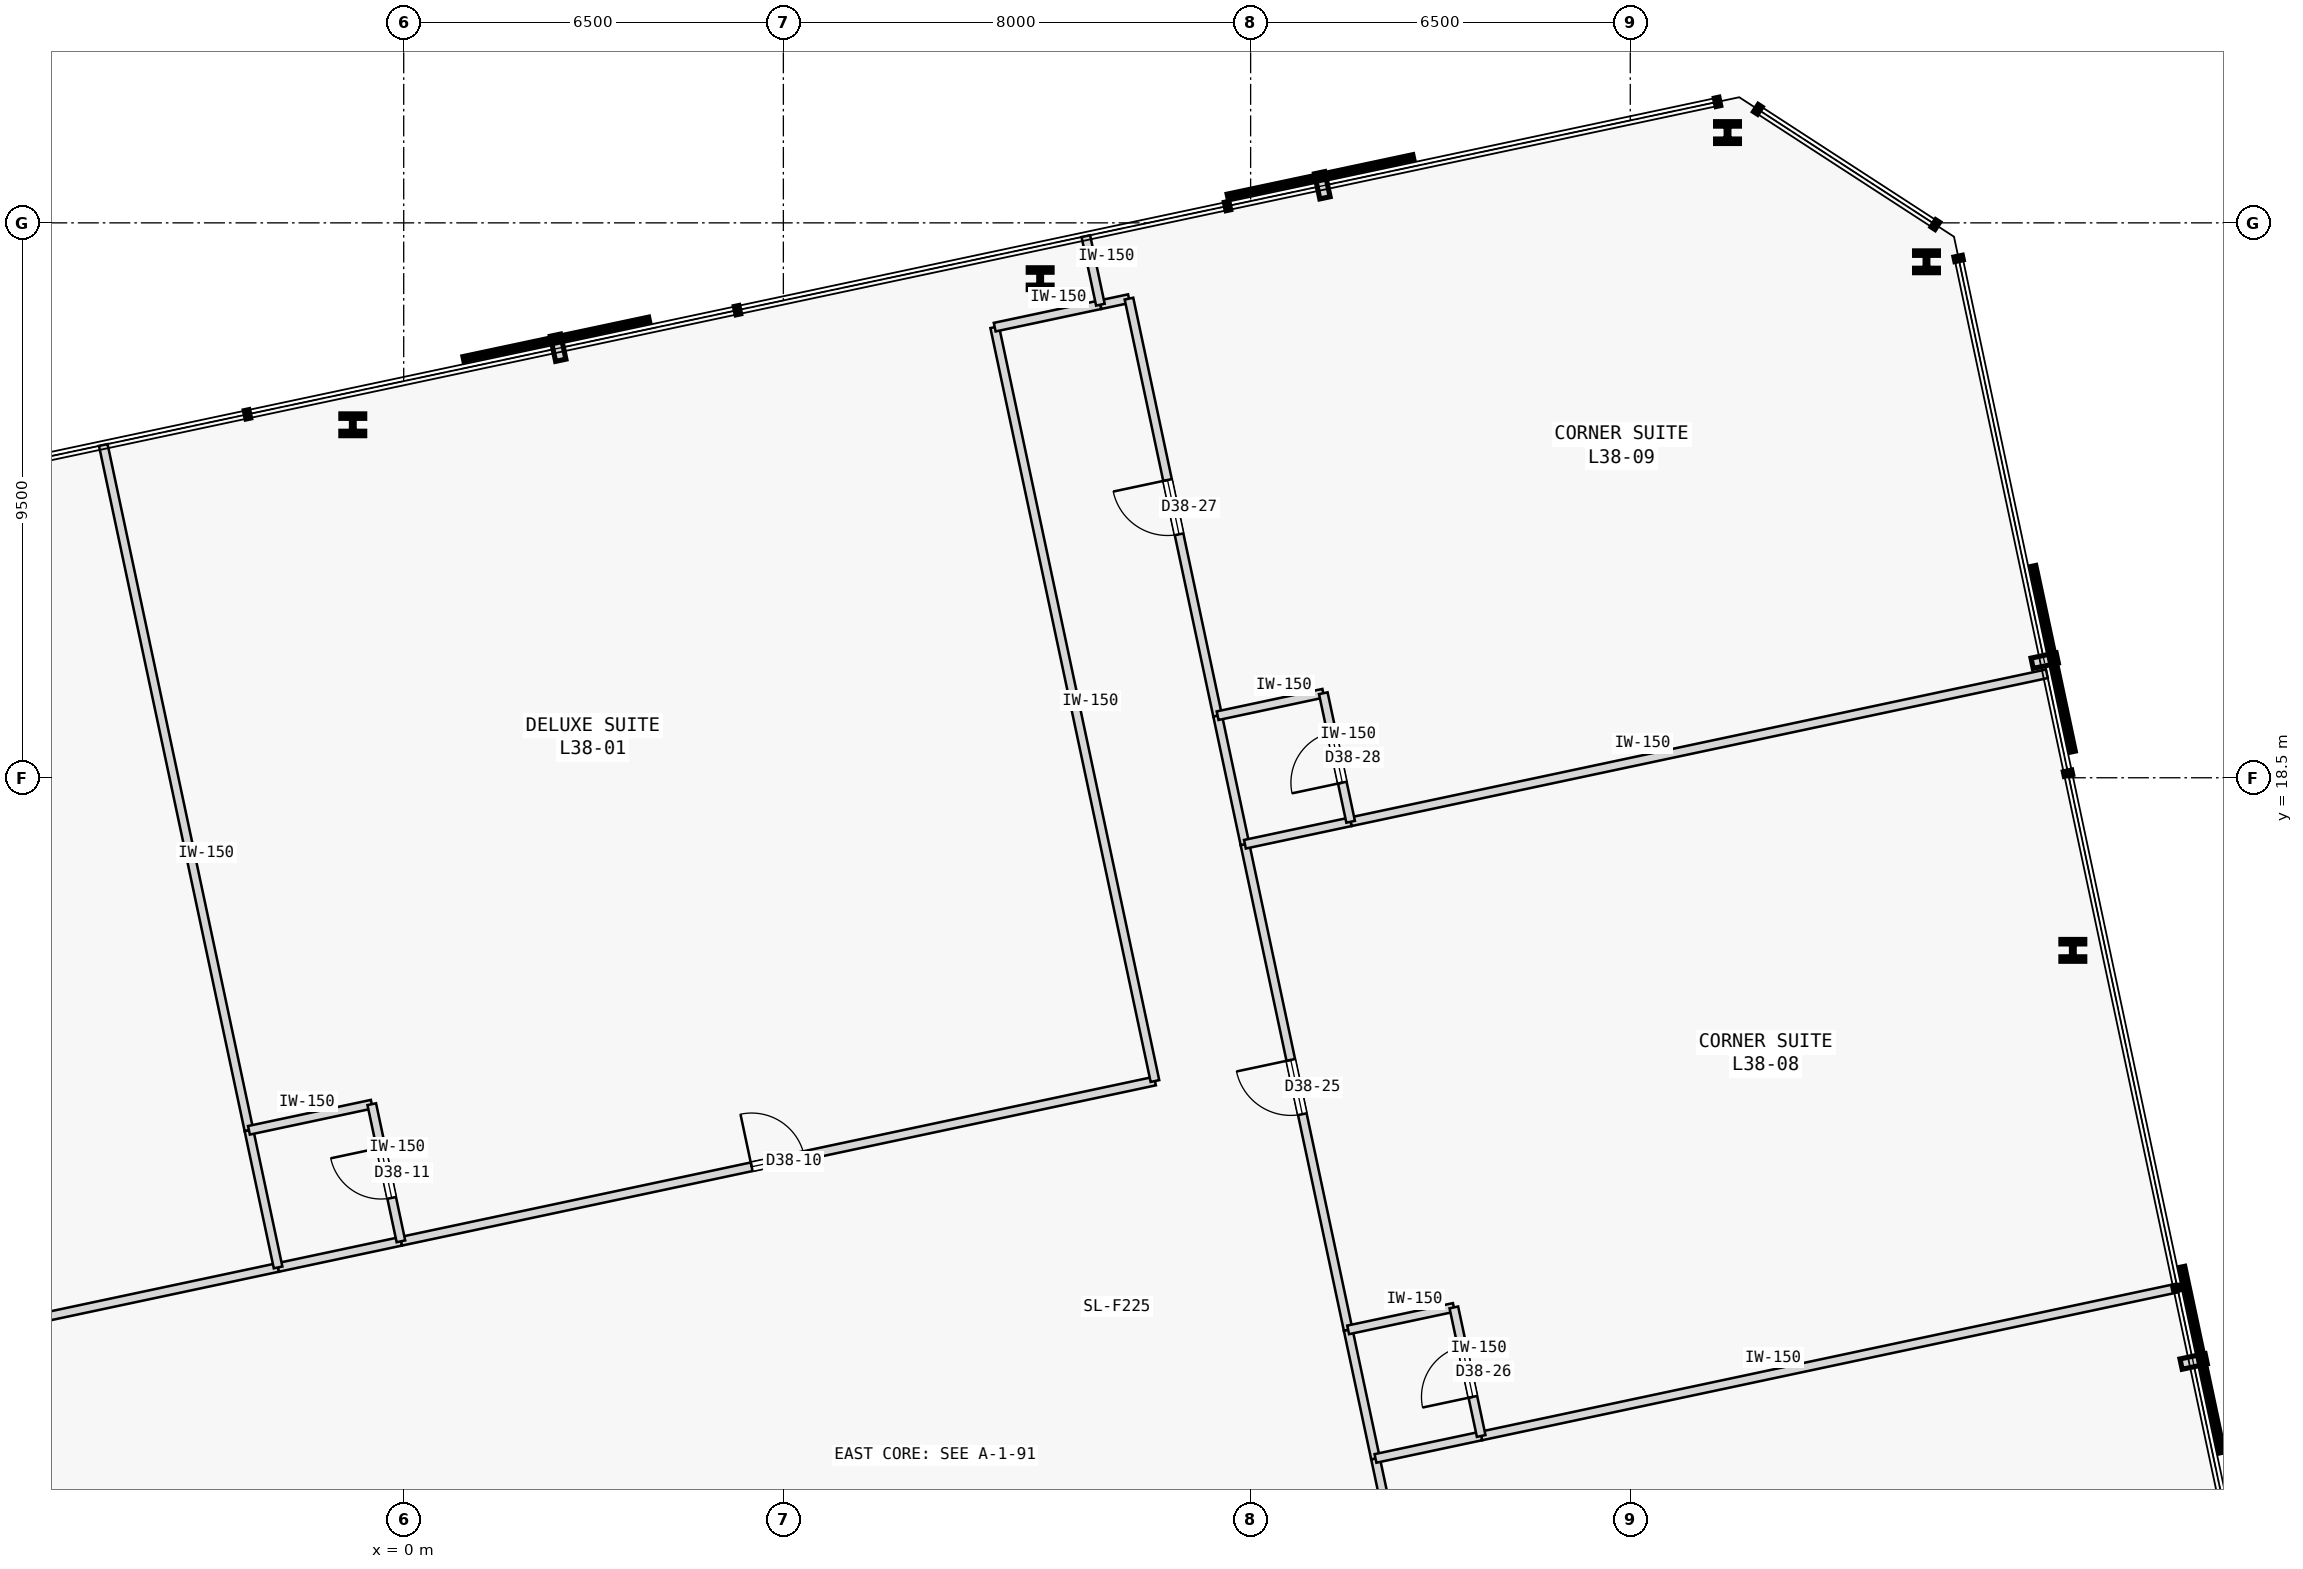
"""IFC4 building model, lengths in metres.
Left out: names, types, materials, properties, quantities, classifications, styles, units other than length and angle.
Written with IfcOpenShell. Run it as: python <this file> out.ifc"""

import sys

from ifc_helpers import new_model, si_unit, direction, frame, frame_2d, origin, origin_2d, place, context, subcontext, project, spatial, rectangle, i_section, extrude, element, fill, save


model = new_model("IFC4")
c1 = context("Model", 3, precision=1e-05, world=origin(), true_north=direction((0.0, 1.0)))
c2 = subcontext(c1, "Body", "Model", "MODEL_VIEW")
j1 = project(units=[si_unit("LENGTHUNIT", "METRE"), si_unit("PLANEANGLEUNIT", "RADIAN")], contexts=[c1])
p1 = place(None, origin())
s1 = spatial("IfcSite", under=j1, at=p1, CompositionType="ELEMENT")
p2 = place(p1, origin())
s2 = spatial("IfcBuilding", under=s1, at=p2, CompositionType="ELEMENT")
p3 = place(p2, frame((0.0, 0.0, 151.4)))
s3 = spatial("IfcBuildingStorey", under=s2, at=p3, CompositionType="ELEMENT", Elevation=151.4)
for number, where, z_axis, x_axis in (
    (1, (28.577, 15.545, 0.0), (0.0, 0.0, 1.0), (1.0, 0.0, 0.0)),
    (2, (26.071, 27.333, 0.0), (0.0, 0.0, 1.0), (1.0, 0.0, 0.0)),
    (3, (22.665, 29.546, 0.0), (0.0, 0.0, 1.0), (1.0, 0.0, 0.0)),
    (4, (10.896, 27.044, 0.0), (0.0, 0.0, 1.0), (1.0, 0.0, 0.0)),
    (5, (-0.872, 24.543, 0.0), (0.0, 0.0, 1.0), (1.0, 0.0, 0.0)),
):
    element("IfcColumn", number, at=place(p3, frame(where, z_axis=z_axis, x_axis=x_axis)), inside=s3, PredefinedType="COLUMN", context=c2, shape_type="SweptSolid", body=[
        extrude(i_section(OverallWidth=0.409, OverallDepth=0.374, WebThickness=0.048, FlangeThickness=0.077, FilletRadius=0.015, at=origin_2d()), origin(), (0.0, 0.0, 1.0), 3.4),
    ])
p4 = place(p3, frame((-17.162, 6.926, 0.0), z_axis=(0.0, 0.0, 1.0), x_axis=(0.978145870853, 0.207919829103, 0.0)))
e6 = element("IfcWall", 6, at=p4, inside=s3, PredefinedType="PARTITIONING", context=c2, shape_type="SweptSolid", body=[
    extrude(rectangle(XDim=15.347, YDim=0.15, at=frame_2d((7.673, 0.0))), origin(), (0.0, 0.0, 1.0), 3.175),
])
p5 = place(p4, frame((7.213, 0.0, 0.0)))
e7 = element("IfcOpeningElement", 7, at=p5, cuts=e6, PredefinedType="OPENING", context=c2, shape_type="SweptSolid", body=[
    extrude(rectangle(XDim=0.92, YDim=2.15, at=frame_2d((0.46, 1.075))), frame((0.0, 0.085, 0.0), z_axis=(0.0, -1.0, 0.0), x_axis=(1.0, 0.0, 0.0)), (0.0, 0.0, 1.0), 0.17),
])
p6 = place(p3, frame((-0.048, 10.564, 0.0), z_axis=(0.0, 0.0, 1.0), x_axis=(0.978149729453, 0.207901675731, 0.0)))
e8 = element("IfcWall", 8, at=p6, inside=s3, PredefinedType="PARTITIONING", context=c2, shape_type="SweptSolid", body=[
    extrude(rectangle(XDim=13.198, YDim=0.15, at=frame_2d((6.599, 0.0))), origin(), (0.0, 0.0, 1.0), 3.175),
])
p7 = place(p6, frame((6.139, 0.0, 0.0)))
e9 = element("IfcOpeningElement", 9, at=p7, cuts=e8, PredefinedType="OPENING", context=c2, shape_type="SweptSolid", body=[
    extrude(rectangle(XDim=0.92, YDim=2.15, at=frame_2d((0.46, 1.075))), frame((0.0, 0.085, 0.0), z_axis=(0.0, -1.0, 0.0), x_axis=(1.0, 0.0, 0.0)), (0.0, 0.0, 1.0), 0.17),
])
p8 = place(p3, frame((12.862, 13.308, 0.0), z_axis=(0.0, 0.0, 1.0), x_axis=(-0.207911421929, 0.978147657888, 0.0)))
e10 = element("IfcWall", 10, at=p8, inside=s3, PredefinedType="PARTITIONING", context=c2, shape_type="SweptSolid", body=[
    extrude(rectangle(XDim=13.195, YDim=0.15, at=frame_2d((6.598, 0.0))), origin(), (0.0, 0.0, 1.0), 3.175),
])
p9 = place(p3, frame((10.118, 26.214, 0.0), z_axis=(0.0, 0.0, 1.0), x_axis=(0.978133353907, 0.20797870558, 0.0)))
e11 = element("IfcWall", 11, at=p9, inside=s3, PredefinedType="PARTITIONING", context=c2, shape_type="SweptSolid", body=[
    extrude(rectangle(XDim=1.85, YDim=0.15, at=frame_2d((0.925, 0.0))), origin(), (0.0, 0.0, 1.0), 3.175),
])
p10 = place(p3, frame((-2.151, 10.117, 0.0), z_axis=(0.0, 0.0, 1.0), x_axis=(0.978146728319, 0.207915795165, 0.0)))
e12 = element("IfcWall", 12, at=p10, inside=s3, PredefinedType="PARTITIONING", context=c2, shape_type="SweptSolid", body=[
    extrude(rectangle(XDim=2.15, YDim=0.15, at=frame_2d((1.075, 0.0))), origin(), (0.0, 0.0, 1.0), 3.175),
])
p11 = place(p3, frame((18.405, -1.468, 0.0), z_axis=(0.0, 0.0, 1.0), x_axis=(-0.207888984761, 0.97815242678, 0.0)))
e13 = element("IfcWall", 13, at=p11, inside=s3, PredefinedType="PARTITIONING", context=c2, shape_type="SweptSolid", body=[
    extrude(rectangle(XDim=8.5, YDim=0.15, at=frame_2d((4.25, 0.0))), origin(), (0.0, 0.0, 1.0), 3.175),
])
p12 = place(p11, frame((3.775, 0.0, 0.0)))
e14 = element("IfcOpeningElement", 14, at=p12, cuts=e13, PredefinedType="OPENING", context=c2, shape_type="SweptSolid", body=[
    extrude(rectangle(XDim=0.95, YDim=2.15, at=frame_2d((0.475, 1.075))), frame((0.0, 0.085, 0.0), z_axis=(0.0, -1.0, 0.0), x_axis=(1.0, 0.0, 0.0)), (0.0, 0.0, 1.0), 0.17),
])
p13 = place(p3, frame((16.17, 9.047, 0.0), z_axis=(0.0, 0.0, 1.0), x_axis=(-0.2079164651, 0.978146585917, 0.0)))
e15 = element("IfcWall", 15, at=p13, inside=s3, PredefinedType="PARTITIONING", context=c2, shape_type="SweptSolid", body=[
    extrude(rectangle(XDim=8.5, YDim=0.15, at=frame_2d((4.25, 0.0))), origin(), (0.0, 0.0, 1.0), 3.175),
])
p14 = place(p13, frame((3.775, 0.0, 0.0)))
e16 = element("IfcOpeningElement", 16, at=p14, cuts=e15, PredefinedType="OPENING", context=c2, shape_type="SweptSolid", body=[
    extrude(rectangle(XDim=0.95, YDim=2.15, at=frame_2d((0.475, 1.075))), frame((0.0, 0.085, 0.0), z_axis=(0.0, -1.0, 0.0), x_axis=(1.0, 0.0, 0.0)), (0.0, 0.0, 1.0), 0.17),
])
p15 = place(p3, frame((16.638, 6.847, 0.0), z_axis=(0.0, 0.0, 1.0), x_axis=(-0.207913264065, 0.978147266328, 0.0)))
e17 = element("IfcWall", 17, at=p15, inside=s3, PredefinedType="PARTITIONING", context=c2, shape_type="SweptSolid", body=[
    extrude(rectangle(XDim=2.25, YDim=0.15, at=frame_2d((1.125, 0.0))), origin(), (0.0, 0.0, 1.0), 3.175),
])
p16 = place(p3, frame((11.928, 26.599, 0.0), z_axis=(0.0, 0.0, 1.0), x_axis=(0.97822210712, 0.207560856478, 0.0)))
e18 = element("IfcWall", 18, at=p16, inside=s3, PredefinedType="PARTITIONING", context=c2, shape_type="SweptSolid", body=[
    extrude(rectangle(XDim=0.5, YDim=0.15, at=frame_2d((0.25, 0.0))), origin(), (0.0, 0.0, 1.0), 3.175),
])
p17 = place(p3, frame((13.935, 19.562, 0.0), z_axis=(0.0, 0.0, 1.0), x_axis=(-0.207923154003, 0.978145164088, 0.0)))
e19 = element("IfcWall", 19, at=p17, inside=s3, PredefinedType="PARTITIONING", context=c2, shape_type="SweptSolid", body=[
    extrude(rectangle(XDim=7.3, YDim=0.15, at=frame_2d((3.65, 0.0))), origin(), (0.0, 0.0, 1.0), 3.175),
])
p18 = place(p17, frame((3.175, 0.0, 0.0)))
e20 = element("IfcOpeningElement", 20, at=p18, cuts=e19, PredefinedType="OPENING", context=c2, shape_type="SweptSolid", body=[
    extrude(rectangle(XDim=0.95, YDim=2.15, at=frame_2d((0.475, 1.075))), frame((0.0, 0.085, 0.0), z_axis=(0.0, -1.0, 0.0), x_axis=(1.0, 0.0, 0.0)), (0.0, 0.0, 1.0), 0.17),
])
p19 = place(p3, frame((14.403, 17.362, 0.0), z_axis=(0.0, 0.0, 1.0), x_axis=(-0.207913264065, 0.978147266328, 0.0)))
e21 = element("IfcWall", 21, at=p19, inside=s3, PredefinedType="PARTITIONING", context=c2, shape_type="SweptSolid", body=[
    extrude(rectangle(XDim=2.25, YDim=0.15, at=frame_2d((1.125, 0.0))), origin(), (0.0, 0.0, 1.0), 3.175),
])
p20 = place(p3, frame((-2.65, 12.464, 0.0), z_axis=(0.0, 0.0, 1.0), x_axis=(-0.207914988081, 0.978146899873, 0.0)))
e22 = element("IfcWall", 22, at=p20, inside=s3, PredefinedType="PARTITIONING", context=c2, shape_type="SweptSolid", body=[
    extrude(rectangle(XDim=11.995, YDim=0.15, at=frame_2d((5.998, 0.0))), origin(), (0.0, 0.0, 1.0), 3.175),
])
p21 = place(p3, frame((-2.151, 10.117, 0.0), z_axis=(0.0, 0.0, 1.0), x_axis=(-0.207917150959, 0.978146440129, 0.0)))
e23 = element("IfcWall", 23, at=p21, inside=s3, PredefinedType="PARTITIONING", context=c2, shape_type="SweptSolid", body=[
    extrude(rectangle(XDim=2.4, YDim=0.15, at=frame_2d((1.2, 0.0))), origin(), (0.0, 0.0, 1.0), 3.175),
])
p22 = place(p3, frame((-2.65, 12.464, 0.0), z_axis=(0.0, 0.0, 1.0), x_axis=(0.978146728319, 0.207915795165, 0.0)))
e24 = element("IfcWall", 24, at=p22, inside=s3, PredefinedType="PARTITIONING", context=c2, shape_type="SweptSolid", body=[
    extrude(rectangle(XDim=2.15, YDim=0.15, at=frame_2d((1.075, 0.0))), origin(), (0.0, 0.0, 1.0), 3.175),
])
p23 = place(p3, frame((-0.048, 10.564, 0.0), z_axis=(0.0, 0.0, 1.0), x_axis=(-0.207917150959, 0.978146440129, 0.0)))
e25 = element("IfcWall", 25, at=p23, inside=s3, PredefinedType="PARTITIONING", context=c2, shape_type="SweptSolid", body=[
    extrude(rectangle(XDim=2.4, YDim=0.15, at=frame_2d((1.2, 0.0))), origin(), (0.0, 0.0, 1.0), 3.175),
])
p24 = place(p23, frame((0.76, 0.0, 0.0)))
e26 = element("IfcOpeningElement", 26, at=p24, cuts=e25, PredefinedType="OPENING", context=c2, shape_type="SweptSolid", body=[
    extrude(rectangle(XDim=0.88, YDim=2.15, at=frame_2d((0.44, 1.075))), frame((0.0, 0.085, 0.0), z_axis=(0.0, -1.0, 0.0), x_axis=(1.0, 0.0, 0.0)), (0.0, 0.0, 1.0), 0.17),
])
p25 = place(p3, frame((11.928, 26.599, 0.0), z_axis=(0.0, 0.0, 1.0), x_axis=(-0.20795853359, 0.978137642823, 0.0)))
e27 = element("IfcWall", 27, at=p25, inside=s3, PredefinedType="PARTITIONING", context=c2, shape_type="SweptSolid", body=[
    extrude(rectangle(XDim=1.2, YDim=0.15, at=frame_2d((0.6, 0.0))), origin(), (0.0, 0.0, 1.0), 3.175),
])
p26 = place(p3, frame((18.447, 7.231, 0.0), z_axis=(0.0, 0.0, 1.0), x_axis=(0.978149634612, 0.207902121941, 0.0)))
e28 = element("IfcWall", 28, at=p26, inside=s3, PredefinedType="PARTITIONING", context=c2, shape_type="SweptSolid", body=[
    extrude(rectangle(XDim=12.187, YDim=0.15, at=frame_2d((6.094, 0.0))), origin(), (0.0, 0.0, 1.0), 3.175),
])
p27 = place(p3, frame((16.638, 6.847, 0.0), z_axis=(0.0, 0.0, 1.0), x_axis=(0.978160192495, 0.207852442415, 0.0)))
e29 = element("IfcWall", 29, at=p27, inside=s3, PredefinedType="PARTITIONING", context=c2, shape_type="SweptSolid", body=[
    extrude(rectangle(XDim=1.85, YDim=0.15, at=frame_2d((0.925, 0.0))), origin(), (0.0, 0.0, 1.0), 3.175),
])
p28 = place(p3, frame((16.17, 9.047, 0.0), z_axis=(0.0, 0.0, 1.0), x_axis=(0.978133353907, 0.20797870558, 0.0)))
e30 = element("IfcWall", 30, at=p28, inside=s3, PredefinedType="PARTITIONING", context=c2, shape_type="SweptSolid", body=[
    extrude(rectangle(XDim=1.85, YDim=0.15, at=frame_2d((0.925, 0.0))), origin(), (0.0, 0.0, 1.0), 3.175),
])
p29 = place(p3, frame((18.447, 7.231, 0.0), z_axis=(0.0, 0.0, 1.0), x_axis=(-0.207891197838, 0.978151956427, 0.0)))
e31 = element("IfcWall", 31, at=p29, inside=s3, PredefinedType="PARTITIONING", context=c2, shape_type="SweptSolid", body=[
    extrude(rectangle(XDim=2.25, YDim=0.15, at=frame_2d((1.125, 0.0))), origin(), (0.0, 0.0, 1.0), 3.175),
])
p30 = place(p29, frame((0.685, 0.0, 0.0)))
e32 = element("IfcOpeningElement", 32, at=p30, cuts=e31, PredefinedType="OPENING", context=c2, shape_type="SweptSolid", body=[
    extrude(rectangle(XDim=0.88, YDim=2.15, at=frame_2d((0.44, 1.075))), frame((0.0, 0.085, 0.0), z_axis=(0.0, -1.0, 0.0), x_axis=(1.0, 0.0, 0.0)), (0.0, 0.0, 1.0), 0.17),
])
p31 = place(p3, frame((16.212, 17.746, 0.0), z_axis=(0.0, 0.0, 1.0), x_axis=(0.978149634612, 0.207902121941, 0.0)))
e33 = element("IfcWall", 33, at=p31, inside=s3, PredefinedType="PARTITIONING", context=c2, shape_type="SweptSolid", body=[
    extrude(rectangle(XDim=12.187, YDim=0.15, at=frame_2d((6.094, 0.0))), origin(), (0.0, 0.0, 1.0), 3.175),
])
for number, where, z_axis, x_axis in (
    (34, (14.403, 17.362, 0.0), (0.0, 0.0, 1.0), (0.978, 0.208, 0.0)),
    (35, (13.935, 19.562, 0.0), (0.0, 0.0, 1.0), (0.978, 0.208, 0.0)),
):
    element("IfcWall", number, at=place(p3, frame(where, z_axis=z_axis, x_axis=x_axis)), inside=s3, PredefinedType="PARTITIONING", context=c2, shape_type="SweptSolid", body=[
        extrude(rectangle(XDim=1.85, YDim=0.15, at=frame_2d((0.925, 0.0))), origin(), (0.0, 0.0, 1.0), 3.175),
    ])
p32 = place(p3, frame((16.212, 17.746, 0.0), z_axis=(0.0, 0.0, 1.0), x_axis=(-0.207913264065, 0.978147266328, 0.0)))
e36 = element("IfcWall", 36, at=p32, inside=s3, PredefinedType="PARTITIONING", context=c2, shape_type="SweptSolid", body=[
    extrude(rectangle(XDim=2.25, YDim=0.15, at=frame_2d((1.125, 0.0))), origin(), (0.0, 0.0, 1.0), 3.175),
])
p33 = place(p32, frame((0.685, 0.0, 0.0)))
e37 = element("IfcOpeningElement", 37, at=p33, cuts=e36, PredefinedType="OPENING", context=c2, shape_type="SweptSolid", body=[
    extrude(rectangle(XDim=0.88, YDim=2.15, at=frame_2d((0.44, 1.075))), frame((0.0, 0.085, 0.0), z_axis=(0.0, -1.0, 0.0), x_axis=(1.0, 0.0, 0.0)), (0.0, 0.0, 1.0), 0.17),
])
p34 = place(p7, origin())
e38 = element("IfcDoor", 38, at=p34, inside=s3, OperationType="SINGLE_SWING_LEFT", PredefinedType="DOOR", context=c2, shape_type="SweptSolid", body=[
    extrude(rectangle(XDim=0.92, YDim=2.15, at=frame_2d((0.46, 1.075))), frame((0.0, 0.025, 0.0), z_axis=(0.0, -1.0, 0.0), x_axis=(1.0, 0.0, 0.0)), (0.0, 0.0, 1.0), 0.05),
])
fill(e9, e38)
p35 = place(p24, origin())
e39 = element("IfcDoor", 39, at=p35, inside=s3, OperationType="SINGLE_SWING_RIGHT", PredefinedType="DOOR", context=c2, shape_type="SweptSolid", body=[
    extrude(rectangle(XDim=0.88, YDim=2.15, at=frame_2d((0.44, 1.075))), frame((0.0, 0.025, 0.0), z_axis=(0.0, -1.0, 0.0), x_axis=(1.0, 0.0, 0.0)), (0.0, 0.0, 1.0), 0.05),
])
fill(e26, e39)
p36 = place(p14, origin())
e40 = element("IfcDoor", 40, at=p36, inside=s3, OperationType="SINGLE_SWING_RIGHT", PredefinedType="DOOR", context=c2, shape_type="SweptSolid", body=[
    extrude(rectangle(XDim=0.95, YDim=2.15, at=frame_2d((0.475, 1.075))), frame((0.0, 0.025, 0.0), z_axis=(0.0, -1.0, 0.0), x_axis=(1.0, 0.0, 0.0)), (0.0, 0.0, 1.0), 0.05),
])
fill(e16, e40)
p37 = place(p30, origin())
e41 = element("IfcDoor", 41, at=p37, inside=s3, OperationType="SINGLE_SWING_LEFT", PredefinedType="DOOR", context=c2, shape_type="SweptSolid", body=[
    extrude(rectangle(XDim=0.88, YDim=2.15, at=frame_2d((0.44, 1.075))), frame((0.0, 0.025, 0.0), z_axis=(0.0, -1.0, 0.0), x_axis=(1.0, 0.0, 0.0)), (0.0, 0.0, 1.0), 0.05),
])
fill(e32, e41)
p38 = place(p18, origin())
e42 = element("IfcDoor", 42, at=p38, inside=s3, OperationType="SINGLE_SWING_RIGHT", PredefinedType="DOOR", context=c2, shape_type="SweptSolid", body=[
    extrude(rectangle(XDim=0.95, YDim=2.15, at=frame_2d((0.475, 1.075))), frame((0.0, 0.025, 0.0), z_axis=(0.0, -1.0, 0.0), x_axis=(1.0, 0.0, 0.0)), (0.0, 0.0, 1.0), 0.05),
])
fill(e20, e42)
p39 = place(p33, origin())
e43 = element("IfcDoor", 43, at=p39, inside=s3, OperationType="SINGLE_SWING_LEFT", PredefinedType="DOOR", context=c2, shape_type="SweptSolid", body=[
    extrude(rectangle(XDim=0.88, YDim=2.15, at=frame_2d((0.44, 1.075))), frame((0.0, 0.025, 0.0), z_axis=(0.0, -1.0, 0.0), x_axis=(1.0, 0.0, 0.0)), (0.0, 0.0, 1.0), 0.05),
])
fill(e37, e43)
save(model, sys.argv[1])
